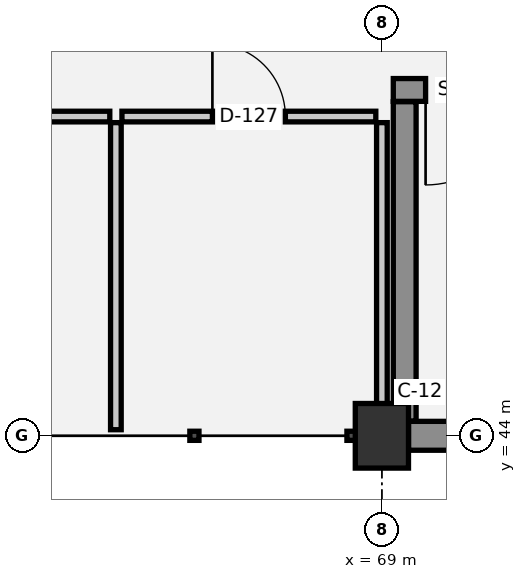
"""IFC4 building model, lengths in metres.
Left out: names, types, materials, properties, quantities, classifications, styles, units other than length and angle.
Written with IfcOpenShell. Run it as: python <this file> out.ifc"""

import sys

from ifc_helpers import new_model, si_unit, direction, frame, frame_2d, origin, origin_2d, place, context, subcontext, project, spatial, rectangle, extrude, element, fill, save


model = new_model("IFC4")
c1 = context("Model", 3, precision=1e-05, world=origin(), true_north=direction((0.0, 1.0)))
c2 = subcontext(c1, "Body", "Model", "MODEL_VIEW")
j1 = project(units=[si_unit("LENGTHUNIT", "METRE"), si_unit("PLANEANGLEUNIT", "RADIAN")], contexts=[c1])
p1 = place(None, origin())
s1 = spatial("IfcSite", under=j1, at=p1, CompositionType="ELEMENT")
p2 = place(p1, origin())
s2 = spatial("IfcBuilding", under=s1, at=p2, CompositionType="ELEMENT")
p3 = place(p2, frame((0.0, 0.0, 9.9)))
s3 = spatial("IfcBuildingStorey", under=s2, at=p3, CompositionType="ELEMENT", Elevation=9.9)
p4 = place(p3, frame((69.0, 44.0, 0.0), z_axis=(0.0, 0.0, 1.0), x_axis=(1.0, 0.0, 0.0)))
e1 = element("IfcColumn", 1, at=p4, inside=s3, PredefinedType="COLUMN", context=c2, shape_type="SweptSolid", body=[
    extrude(rectangle(XDim=0.7, YDim=0.85, at=origin_2d()), origin(), (0.0, 0.0, 1.0), 4.5),
])
p5 = place(p3, frame((76.65, 44.0, 0.0), z_axis=(0.0, 0.0, 1.0), x_axis=(-1.0, 0.0, 0.0)))
e2 = element("IfcWall", 2, at=p5, inside=s3, PredefinedType="STANDARD", context=c2, shape_type="SweptSolid", body=[
    extrude(rectangle(XDim=7.3, YDim=0.38, at=frame_2d((3.65, 0.0))), origin(), (0.0, 0.0, 1.0), 3.23),
])
p6 = place(p5, frame((2.925, 0.0, 0.95)))
e3 = element("IfcOpeningElement", 3, at=p6, cuts=e2, PredefinedType="OPENING", context=c2, shape_type="SweptSolid", body=[
    extrude(rectangle(XDim=1.45, YDim=1.7, at=frame_2d((0.725, 0.85))), frame((0.0, 0.2, 0.0), z_axis=(0.0, -1.0, 0.0), x_axis=(1.0, 0.0, 0.0)), (0.0, 0.0, 1.0), 0.4),
])
p7 = place(p3, frame((76.85, 48.55, 0.0), z_axis=(0.0, 0.0, 1.0), x_axis=(-1.0, 0.0, 0.0)))
e4 = element("IfcWall", 4, at=p7, inside=s3, PredefinedType="SHEAR", context=c2, shape_type="SweptSolid", body=[
    extrude(rectangle(XDim=7.7, YDim=0.3, at=frame_2d((3.85, 0.0))), origin(), (0.0, 0.0, 1.0), 4.2),
])
p8 = place(p7, frame((6.025, 0.0, 0.0)))
e5 = element("IfcOpeningElement", 5, at=p8, cuts=e4, PredefinedType="OPENING", context=c2, shape_type="SweptSolid", body=[
    extrude(rectangle(XDim=1.25, YDim=2.15, at=frame_2d((0.625, 1.075))), frame((0.0, 0.16, 0.0), z_axis=(0.0, -1.0, 0.0), x_axis=(1.0, 0.0, 0.0)), (0.0, 0.0, 1.0), 0.32),
])
p9 = place(p3, frame((69.3, 48.395, 0.0), z_axis=(0.0, 0.0, 1.0), x_axis=(0.0, -1.0, 0.0)))
e6 = element("IfcWall", 6, at=p9, inside=s3, PredefinedType="SHEAR", context=c2, shape_type="SweptSolid", body=[
    extrude(rectangle(XDim=4.2, YDim=0.3, at=frame_2d((2.1, 0.0))), origin(), (0.0, 0.0, 1.0), 4.2),
])
p10 = place(p3, frame((62.08, 48.2, 0.0), z_axis=(0.0, 0.0, 1.0), x_axis=(1.0, 0.0, 0.0)))
e7 = element("IfcWall", 7, at=p10, inside=s3, PredefinedType="PLUMBINGWALL", context=c2, shape_type="SweptSolid", body=[
    extrude(rectangle(XDim=3.34, YDim=0.14, at=frame_2d((1.67, 0.0))), origin(), (0.0, 0.0, 1.0), 4.14),
])
p11 = place(p10, frame((1.21, 0.0, 0.0)))
e8 = element("IfcOpeningElement", 8, at=p11, cuts=e7, PredefinedType="OPENING", context=c2, shape_type="SweptSolid", body=[
    extrude(rectangle(XDim=0.92, YDim=2.1, at=frame_2d((0.46, 1.05))), frame((0.0, 0.08, 0.0), z_axis=(0.0, -1.0, 0.0), x_axis=(1.0, 0.0, 0.0)), (0.0, 0.0, 1.0), 0.16),
])
p12 = place(p3, frame((65.58, 48.2, 0.0), z_axis=(0.0, 0.0, 1.0), x_axis=(1.0, 0.0, 0.0)))
e9 = element("IfcWall", 9, at=p12, inside=s3, PredefinedType="PLUMBINGWALL", context=c2, shape_type="SweptSolid", body=[
    extrude(rectangle(XDim=3.34, YDim=0.14, at=frame_2d((1.67, 0.0))), origin(), (0.0, 0.0, 1.0), 4.14),
])
p13 = place(p12, frame((1.19, 0.0, 0.0)))
e10 = element("IfcOpeningElement", 10, at=p13, cuts=e9, PredefinedType="OPENING", context=c2, shape_type="SweptSolid", body=[
    extrude(rectangle(XDim=0.96, YDim=2.1, at=frame_2d((0.48, 1.05))), frame((0.0, 0.08, 0.0), z_axis=(0.0, -1.0, 0.0), x_axis=(1.0, 0.0, 0.0)), (0.0, 0.0, 1.0), 0.16),
])
p14 = place(p3, frame((65.5, 44.08, 0.0), z_axis=(0.0, 0.0, 1.0), x_axis=(0.0, 1.0, 0.0)))
e11 = element("IfcWall", 11, at=p14, inside=s3, PredefinedType="PLUMBINGWALL", context=c2, shape_type="SweptSolid", body=[
    extrude(rectangle(XDim=4.04, YDim=0.14, at=frame_2d((2.02, 0.0))), origin(), (0.0, 0.0, 1.0), 4.14),
])
p15 = place(p3, frame((69.0, 44.08, 0.0), z_axis=(0.0, 0.0, 1.0), x_axis=(0.0, 1.0, 0.0)))
e12 = element("IfcWall", 12, at=p15, inside=s3, PredefinedType="PLUMBINGWALL", context=c2, shape_type="SweptSolid", body=[
    extrude(rectangle(XDim=4.04, YDim=0.14, at=frame_2d((2.02, 0.0))), origin(), (0.0, 0.0, 1.0), 3.6),
])
p16 = place(p8, origin())
e13 = element("IfcDoor", 13, at=p16, inside=s3, OperationType="SINGLE_SWING_RIGHT", PredefinedType="DOOR", context=c2, shape_type="SweptSolid", body=[
    extrude(rectangle(XDim=1.25, YDim=2.15, at=frame_2d((0.625, 1.075))), frame((0.0, 0.025, 0.0), z_axis=(0.0, -1.0, 0.0), x_axis=(1.0, 0.0, 0.0)), (0.0, 0.0, 1.0), 0.05),
])
fill(e5, e13)
p17 = place(p13, origin())
e14 = element("IfcDoor", 14, at=p17, inside=s3, OperationType="SINGLE_SWING_LEFT", PredefinedType="DOOR", context=c2, shape_type="SweptSolid", body=[
    extrude(rectangle(XDim=0.96, YDim=2.1, at=frame_2d((0.48, 1.05))), frame((0.0, 0.025, 0.0), z_axis=(0.0, -1.0, 0.0), x_axis=(1.0, 0.0, 0.0)), (0.0, 0.0, 1.0), 0.05),
])
fill(e10, e14)
save(model, sys.argv[1])
